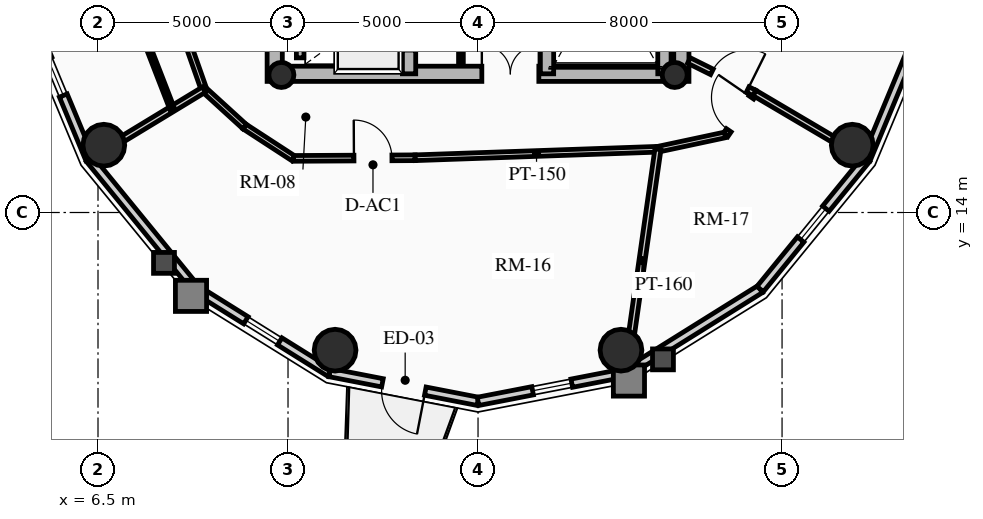
"""IFC4 building model, lengths in metres.
Left out: names, types, materials, properties, quantities, classifications, styles, units other than length and angle.
Written with IfcOpenShell. Run it as: python <this file> out.ifc"""

import sys

from ifc_helpers import new_model, si_unit, direction, frame, frame_2d, origin, origin_2d, place, context, subcontext, project, spatial, rectangle, circle, hollow_circle, extrude, source, transform, mapped, element, fill, save


model = new_model("IFC4")
c1 = context("Model", 3, precision=1e-05, world=origin(), true_north=direction((0.0, 1.0)))
c2 = subcontext(c1, "Body", "Model", "MODEL_VIEW")
j1 = project(units=[si_unit("LENGTHUNIT", "METRE"), si_unit("PLANEANGLEUNIT", "RADIAN")], contexts=[c1])
p1 = place(None, origin())
s1 = spatial("IfcSite", under=j1, at=p1, CompositionType="ELEMENT")
p2 = place(p1, origin())
s2 = spatial("IfcBuilding", under=s1, at=p2, CompositionType="ELEMENT")
p3 = place(p2, frame((0.0, 0.0, 214.12)))
s3 = spatial("IfcBuildingStorey", under=s2, at=p3, CompositionType="ELEMENT", Elevation=214.12)
for number, where, z_axis, x_axis in (
    (1, (11.15, 17.45, 0.0), (0.0, 0.0, 1.0), (0.0, 1.0, 0.0)),
    (2, (21.85, 17.45, 0.0), (0.0, 0.0, 1.0), (0.0, 1.0, 0.0)),
):
    element("IfcWall", number, at=place(p3, frame(where, z_axis=z_axis, x_axis=x_axis)), inside=s3, PredefinedType="SHEAR", context=c2, shape_type="SweptSolid", body=[
        extrude(rectangle(XDim=14.1, YDim=0.4, at=frame_2d((7.05, 0.0))), origin(), (0.0, 0.0, 1.0), 2.91),
    ])
p4 = place(p3, frame((11.15, 17.65, 0.0), z_axis=(0.0, 0.0, 1.0), x_axis=(1.0, 0.0, 0.0)))
e3 = element("IfcWall", 3, at=p4, inside=s3, PredefinedType="SHEAR", context=c2, shape_type="SweptSolid", body=[
    extrude(rectangle(XDim=10.7, YDim=0.4, at=frame_2d((5.35, 0.0))), origin(), (0.0, 0.0, 1.0), 2.91),
])
m1 = source(origin(), c2, "Body", "SweptSolid", [
    extrude(rectangle(XDim=1.5, YDim=2.02, at=frame_2d((0.75, 1.01))), frame((0.0, 0.21, 0.0), z_axis=(0.0, -1.0, 0.0), x_axis=(1.0, 0.0, 0.0)), (0.0, 0.0, 1.0), 0.42),
])
p5 = place(p4, frame((5.45, 0.0, 0.0)))
e4 = element("IfcOpeningElement", 4, at=p5, cuts=e3, PredefinedType="OPENING", context=c2, shape_type="MappedRepresentation", body=[
    mapped(m1, transform((0.0, 0.0, 0.0), x_axis=(1.0, 0.0, 0.0), y_axis=(0.0, 1.0, 0.0), z_axis=(0.0, 0.0, 1.0), scale=1.0)),
])
p6 = place(p3, frame((14.685, 17.65, 0.0), z_axis=(0.0, 0.0, 1.0), x_axis=(0.0, 1.0, 0.0)))
e5 = element("IfcWall", 5, at=p6, inside=s3, PredefinedType="SHEAR", context=c2, shape_type="SweptSolid", body=[
    extrude(rectangle(XDim=13.7, YDim=0.35, at=frame_2d((6.85, 0.0))), origin(), (0.0, 0.0, 1.0), 2.91),
])
m2 = source(origin(), c2, "Body", "SweptSolid", [
    extrude(rectangle(XDim=1.1, YDim=2.015, at=frame_2d((0.55, 1.007))), frame((0.0, 0.185, 0.0), z_axis=(0.0, -1.0, 0.0), x_axis=(1.0, 0.0, 0.0)), (0.0, 0.0, 1.0), 0.37),
])
p7 = place(p6, frame((4.85, 0.0, 0.0)))
e6 = element("IfcOpeningElement", 6, at=p7, cuts=e5, PredefinedType="OPENING", context=c2, shape_type="MappedRepresentation", body=[
    mapped(m2, transform((0.0, 0.0, 0.0), x_axis=(1.0, 0.0, 0.0), y_axis=(0.0, 1.0, 0.0), z_axis=(0.0, 0.0, 1.0), scale=1.0)),
])
p8 = place(p6, frame((0.625, 0.0, 0.0)))
e7 = element("IfcOpeningElement", 7, at=p8, cuts=e5, PredefinedType="OPENING", context=c2, shape_type="MappedRepresentation", body=[
    mapped(m2, transform((0.0, 0.0, 0.0), x_axis=(1.0, 0.0, 0.0), y_axis=(0.0, 1.0, 0.0), z_axis=(0.0, 0.0, 1.0), scale=1.0)),
])
p9 = place(p6, frame((2.625, 0.0, 0.0)))
e8 = element("IfcOpeningElement", 8, at=p9, cuts=e5, PredefinedType="OPENING", context=c2, shape_type="MappedRepresentation", body=[
    mapped(m2, transform((0.0, 0.0, 0.0), x_axis=(1.0, 0.0, 0.0), y_axis=(0.0, 1.0, 0.0), z_axis=(0.0, 0.0, 1.0), scale=1.0)),
])
m3 = source(origin(), c2, "Body", "SweptSolid", [
    extrude(rectangle(XDim=1.15, YDim=2.02, at=frame_2d((0.575, 1.01))), frame((0.0, 0.185, 0.0), z_axis=(0.0, -1.0, 0.0), x_axis=(1.0, 0.0, 0.0)), (0.0, 0.0, 1.0), 0.37),
])
p10 = place(p6, frame((7.27, 0.0, 0.0)))
e9 = element("IfcOpeningElement", 9, at=p10, cuts=e5, PredefinedType="OPENING", context=c2, shape_type="MappedRepresentation", body=[
    mapped(m3, transform((0.0, 0.0, 0.0), x_axis=(1.0, 0.0, 0.0), y_axis=(0.0, 1.0, 0.0), z_axis=(0.0, 0.0, 1.0), scale=1.0)),
])
p11 = place(p3, frame((18.315, 17.65, 0.0), z_axis=(0.0, 0.0, 1.0), x_axis=(0.0, 1.0, 0.0)))
e10 = element("IfcWall", 10, at=p11, inside=s3, PredefinedType="SHEAR", context=c2, shape_type="SweptSolid", body=[
    extrude(rectangle(XDim=9.6, YDim=0.35, at=frame_2d((4.8, 0.0))), origin(), (0.0, 0.0, 1.0), 2.91),
])
p12 = place(p11, frame((5.28, 0.0, 0.0)))
e11 = element("IfcOpeningElement", 11, at=p12, cuts=e10, PredefinedType="OPENING", context=c2, shape_type="MappedRepresentation", body=[
    mapped(m3, transform((0.0, 0.0, 0.0), x_axis=(1.0, 0.0, 0.0), y_axis=(0.0, 1.0, 0.0), z_axis=(0.0, 0.0, 1.0), scale=1.0)),
])
p13 = place(p3, frame((21.405, 17.65, 0.0), z_axis=(0.0, 0.0, 1.0), x_axis=(0.0, 1.0, 0.0)))
e12 = element("IfcWall", 12, at=p13, inside=s3, PredefinedType="SHEAR", context=c2, shape_type="SweptSolid", body=[
    extrude(rectangle(XDim=6.695, YDim=0.35, at=frame_2d((3.348, 0.0))), origin(), (0.0, 0.0, 1.0), 2.91),
])
for number, where, z_axis, x_axis in (
    (13, (11.325, 17.62, 0.0), (0.0, 0.0, 1.0), (1.0, 0.0, 0.0)),
    (14, (21.675, 17.62, 0.0), (0.0, 0.0, 1.0), (1.0, 0.0, 0.0)),
):
    element("IfcColumn", number, at=place(p3, frame(where, z_axis=z_axis, x_axis=x_axis)), inside=s3, PredefinedType="COLUMN", context=c2, shape_type="SweptSolid", body=[
        extrude(hollow_circle(Radius=0.33, WallThickness=0.025, at=origin_2d()), origin(), (0.0, 0.0, 1.0), 2.91),
    ])
for number, where, z_axis, x_axis in (
    (15, (6.653, 15.771, 0.0), (0.0, 0.0, 1.0), (1.0, 0.0, 0.0)),
    (16, (12.739, 10.377, 0.0), (0.0, 0.0, 1.0), (1.0, 0.0, 0.0)),
    (17, (20.261, 10.377, 0.0), (0.0, 0.0, 1.0), (1.0, 0.0, 0.0)),
    (18, (26.347, 15.771, 0.0), (0.0, 0.0, 1.0), (1.0, 0.0, 0.0)),
):
    element("IfcColumn", number, at=place(p3, frame(where, z_axis=z_axis, x_axis=x_axis)), inside=s3, PredefinedType="USERDEFINED", context=c2, shape_type="SweptSolid", body=[
        extrude(circle(Radius=0.55, at=origin_2d()), origin(), (0.0, 0.0, 1.0), 2.91),
    ])
p14 = place(p3, frame((6.282, 15.407, 0.0), z_axis=(0.0, 0.0, 1.0), x_axis=(-0.384036305194, 0.923317993052, 0.0)))
e19 = element("IfcWall", 19, at=p14, inside=s3, PredefinedType="SOLIDWALL", context=c2, shape_type="SweptSolid", body=[
    extrude(rectangle(XDim=4.671, YDim=0.22, at=frame_2d((2.335, 0.0))), origin(), (0.0, 0.0, 1.0), 2.322),
])
m4 = source(origin(), c2, "Body", "SweptSolid", [
    extrude(rectangle(XDim=1.05, YDim=1.3, at=frame_2d((0.525, 0.65))), frame((0.0, 0.12, 0.0), z_axis=(0.0, -1.0, 0.0), x_axis=(1.0, 0.0, 0.0)), (0.0, 0.0, 1.0), 0.24),
])
p15 = place(p14, frame((1.81, 0.0, 0.65)))
e20 = element("IfcOpeningElement", 20, at=p15, cuts=e19, PredefinedType="OPENING", context=c2, shape_type="MappedRepresentation", body=[
    mapped(m4, transform((0.0, 0.0, 0.0), x_axis=(1.0, 0.0, 0.0), y_axis=(0.0, 1.0, 0.0), z_axis=(0.0, 0.0, 1.0), scale=1.0)),
])
p16 = place(p3, frame((9.076, 11.985, 0.0), z_axis=(0.0, 0.0, 1.0), x_axis=(-0.632467166636, 0.774587169483, 0.0)))
e21 = element("IfcWall", 21, at=p16, inside=s3, PredefinedType="SOLIDWALL", context=c2, shape_type="SweptSolid", body=[
    extrude(rectangle(XDim=4.418, YDim=0.22, at=frame_2d((2.209, 0.0))), origin(), (0.0, 0.0, 1.0), 2.322),
])
p17 = place(p3, frame((12.597, 9.787, 0.0), z_axis=(0.0, 0.0, 1.0), x_axis=(-0.848318713376, 0.529485939886, 0.0)))
e22 = element("IfcWall", 22, at=p17, inside=s3, PredefinedType="SOLIDWALL", context=c2, shape_type="SweptSolid", body=[
    extrude(rectangle(XDim=4.15, YDim=0.22, at=frame_2d((2.075, 0.0))), origin(), (0.0, 0.0, 1.0), 2.322),
])
p18 = place(p17, frame((1.55, 0.0, 0.65)))
e23 = element("IfcOpeningElement", 23, at=p18, cuts=e22, PredefinedType="OPENING", context=c2, shape_type="MappedRepresentation", body=[
    mapped(m4, transform((0.0, 0.0, 0.0), x_axis=(1.0, 0.0, 0.0), y_axis=(0.0, 1.0, 0.0), z_axis=(0.0, 0.0, 1.0), scale=1.0)),
])
p19 = place(p3, frame((16.5, 9.03, 0.0), z_axis=(0.0, 0.0, 1.0), x_axis=(-0.981700307484, 0.190432419211, 0.0)))
e24 = element("IfcWall", 24, at=p19, inside=s3, PredefinedType="SOLIDWALL", context=c2, shape_type="SweptSolid", body=[
    extrude(rectangle(XDim=3.976, YDim=0.22, at=frame_2d((1.988, 0.0))), origin(), (0.0, 0.0, 1.0), 2.322),
])
m5 = source(origin(), c2, "Body", "SweptSolid", [
    extrude(rectangle(XDim=1.15, YDim=2.005, at=frame_2d((0.575, 1.002))), frame((0.0, 0.12, 0.0), z_axis=(0.0, -1.0, 0.0), x_axis=(1.0, 0.0, 0.0)), (0.0, 0.0, 1.0), 0.24),
])
p20 = place(p19, frame((1.413, 0.0, 0.0)))
e25 = element("IfcOpeningElement", 25, at=p20, cuts=e24, PredefinedType="OPENING", context=c2, shape_type="MappedRepresentation", body=[
    mapped(m5, transform((0.0, 0.0, 0.0), x_axis=(1.0, 0.0, 0.0), y_axis=(0.0, 1.0, 0.0), z_axis=(0.0, 0.0, 1.0), scale=1.0)),
])
p21 = place(p3, frame((20.403, 9.787, 0.0), z_axis=(0.0, 0.0, 1.0), x_axis=(-0.981700307484, -0.190432419211, 0.0)))
e26 = element("IfcWall", 26, at=p21, inside=s3, PredefinedType="SOLIDWALL", context=c2, shape_type="SweptSolid", body=[
    extrude(rectangle(XDim=3.976, YDim=0.22, at=frame_2d((1.988, 0.0))), origin(), (0.0, 0.0, 1.0), 2.322),
])
p22 = place(p21, frame((1.463, 0.0, 0.65)))
e27 = element("IfcOpeningElement", 27, at=p22, cuts=e26, PredefinedType="OPENING", context=c2, shape_type="MappedRepresentation", body=[
    mapped(m4, transform((0.0, 0.0, 0.0), x_axis=(1.0, 0.0, 0.0), y_axis=(0.0, 1.0, 0.0), z_axis=(0.0, 0.0, 1.0), scale=1.0)),
])
p23 = place(p3, frame((23.924, 11.985, 0.0), z_axis=(0.0, 0.0, 1.0), x_axis=(-0.848318713376, -0.529485939886, 0.0)))
e28 = element("IfcWall", 28, at=p23, inside=s3, PredefinedType="SOLIDWALL", context=c2, shape_type="SweptSolid", body=[
    extrude(rectangle(XDim=4.15, YDim=0.22, at=frame_2d((2.075, 0.0))), origin(), (0.0, 0.0, 1.0), 2.322),
])
p24 = place(p3, frame((26.718, 15.407, 0.0), z_axis=(0.0, 0.0, 1.0), x_axis=(-0.632467166636, -0.774587169483, 0.0)))
e29 = element("IfcWall", 29, at=p24, inside=s3, PredefinedType="SOLIDWALL", context=c2, shape_type="SweptSolid", body=[
    extrude(rectangle(XDim=4.418, YDim=0.22, at=frame_2d((2.209, 0.0))), origin(), (0.0, 0.0, 1.0), 2.322),
])
p25 = place(p24, frame((1.684, 0.0, 0.65)))
e30 = element("IfcOpeningElement", 30, at=p25, cuts=e29, PredefinedType="OPENING", context=c2, shape_type="MappedRepresentation", body=[
    mapped(m4, transform((0.0, 0.0, 0.0), x_axis=(1.0, 0.0, 0.0), y_axis=(0.0, 1.0, 0.0), z_axis=(0.0, 0.0, 1.0), scale=1.0)),
])
p26 = place(p3, frame((28.512, 19.719, 0.0), z_axis=(0.0, 0.0, 1.0), x_axis=(-0.384036305194, -0.923317993052, 0.0)))
e31 = element("IfcWall", 31, at=p26, inside=s3, PredefinedType="SOLIDWALL", context=c2, shape_type="SweptSolid", body=[
    extrude(rectangle(XDim=4.671, YDim=0.22, at=frame_2d((2.335, 0.0))), origin(), (0.0, 0.0, 1.0), 2.322),
])
p27 = place(p3, frame((11.82, 18.07, 0.0), z_axis=(0.0, 0.0, 1.0), x_axis=(0.0, 1.0, 0.0)))
e32 = element("IfcWall", 32, at=p27, inside=s3, PredefinedType="SHEAR", context=c2, shape_type="SweptSolid", body=[
    extrude(rectangle(XDim=1.635, YDim=0.2, at=frame_2d((0.817, 0.0))), origin(), (0.0, 0.0, 1.0), 2.91),
])
p28 = place(p3, frame((16.05, 17.92, 0.0), z_axis=(0.0, 0.0, 1.0), x_axis=(0.0, 1.0, 0.0)))
e33 = element("IfcWall", 33, at=p28, inside=s3, PredefinedType="PARTITIONING", context=c2, shape_type="SweptSolid", body=[
    extrude(rectangle(XDim=1.8, YDim=0.125, at=frame_2d((0.9, 0.0))), origin(), (0.0, 0.0, 1.0), 2.685),
])
m6 = source(origin(), c2, "Body", "SweptSolid", [
    extrude(rectangle(XDim=0.9, YDim=2.005, at=frame_2d((0.45, 1.002))), frame((0.0, 0.073, 0.0), z_axis=(0.0, -1.0, 0.0), x_axis=(1.0, 0.0, 0.0)), (0.0, 0.0, 1.0), 0.145),
])
p29 = place(p28, frame((0.42, 0.0, 0.0)))
e34 = element("IfcOpeningElement", 34, at=p29, cuts=e33, PredefinedType="OPENING", context=c2, shape_type="MappedRepresentation", body=[
    mapped(m6, transform((0.0, 0.0, 0.0), x_axis=(1.0, 0.0, 0.0), y_axis=(0.0, 1.0, 0.0), z_axis=(0.0, 0.0, 1.0), scale=1.0)),
])
p30 = place(p3, frame((8.832, 18.534, 0.0), z_axis=(0.0, 0.0, 1.0), x_axis=(0.332031819657, -0.943268186008, 0.0)))
e35 = element("IfcWall", 35, at=p30, inside=s3, PredefinedType="PARTITIONING", context=c2, shape_type="SweptSolid", body=[
    extrude(rectangle(XDim=1.377, YDim=0.15, at=frame_2d((0.688, 0.0))), origin(), (0.0, 0.0, 1.0), 2.255),
])
p31 = place(p3, frame((9.289, 17.235, 0.0), z_axis=(0.0, 0.0, 1.0), x_axis=(0.739015164946, -0.673688790155, 0.0)))
e36 = element("IfcWall", 36, at=p31, inside=s3, PredefinedType="PARTITIONING", context=c2, shape_type="SweptSolid", body=[
    extrude(rectangle(XDim=1.446, YDim=0.15, at=frame_2d((0.723, 0.0))), origin(), (0.0, 0.0, 1.0), 2.322),
])
p32 = place(p3, frame((10.358, 16.26, 0.0), z_axis=(0.0, 0.0, 1.0), x_axis=(0.838265397059, -0.545262435983, 0.0)))
e37 = element("IfcWall", 37, at=p32, inside=s3, PredefinedType="PARTITIONING", context=c2, shape_type="SweptSolid", body=[
    extrude(rectangle(XDim=1.534, YDim=0.15, at=frame_2d((0.767, 0.0))), origin(), (0.0, 0.0, 1.0), 2.255),
])
p33 = place(p3, frame((11.644, 15.424, 0.0), z_axis=(0.0, 0.0, 1.0), x_axis=(0.999986552511, 0.005186019339, 0.0)))
e38 = element("IfcWall", 38, at=p33, inside=s3, PredefinedType="PARTITIONING", context=c2, shape_type="SweptSolid", body=[
    extrude(rectangle(XDim=3.201, YDim=0.15, at=frame_2d((1.601, 0.0))), origin(), (0.0, 0.0, 1.0), 2.322),
])
m7 = source(origin(), c2, "Body", "SweptSolid", [
    extrude(rectangle(XDim=1.0, YDim=2.015, at=frame_2d((0.5, 1.007))), frame((0.0, 0.085, 0.0), z_axis=(0.0, -1.0, 0.0), x_axis=(1.0, 0.0, 0.0)), (0.0, 0.0, 1.0), 0.17),
])
p34 = place(p33, frame((1.591, 0.0, 0.0)))
e39 = element("IfcOpeningElement", 39, at=p34, cuts=e38, PredefinedType="OPENING", context=c2, shape_type="MappedRepresentation", body=[
    mapped(m7, transform((0.0, 0.0, 0.0), x_axis=(1.0, 0.0, 0.0), y_axis=(0.0, 1.0, 0.0), z_axis=(0.0, 0.0, 1.0), scale=1.0)),
])
p35 = place(p3, frame((14.845, 15.441, 0.0), z_axis=(0.0, 0.0, 1.0), x_axis=(0.99938794868, 0.034981824334, 0.0)))
e40 = element("IfcWall", 40, at=p35, inside=s3, PredefinedType="PARTITIONING", context=c2, shape_type="SweptSolid", body=[
    extrude(rectangle(XDim=6.393, YDim=0.15, at=frame_2d((3.196, 0.0))), origin(), (0.0, 0.0, 1.0), 2.255),
])
p36 = place(p3, frame((21.234, 15.664, 0.0), z_axis=(0.0, 0.0, 1.0), x_axis=(0.977931581182, 0.208925399431, 0.0)))
e41 = element("IfcWall", 41, at=p36, inside=s3, PredefinedType="PARTITIONING", context=c2, shape_type="SweptSolid", body=[
    extrude(rectangle(XDim=1.823, YDim=0.15, at=frame_2d((0.912, 0.0))), origin(), (0.0, 0.0, 1.0), 2.255),
])
p37 = place(p3, frame((23.017, 16.045, 0.0), z_axis=(0.0, 0.0, 1.0), x_axis=(0.566660656138, 0.823951273308, 0.0)))
e42 = element("IfcWall", 42, at=p37, inside=s3, PredefinedType="PARTITIONING", context=c2, shape_type="SweptSolid", body=[
    extrude(rectangle(XDim=1.336, YDim=0.15, at=frame_2d((0.668, 0.0))), origin(), (0.0, 0.0, 1.0), 2.322),
])
m8 = source(origin(), c2, "Body", "SweptSolid", [
    extrude(rectangle(XDim=1.05, YDim=2.015, at=frame_2d((0.525, 1.007))), frame((0.0, 0.085, 0.0), z_axis=(0.0, -1.0, 0.0), x_axis=(1.0, 0.0, 0.0)), (0.0, 0.0, 1.0), 0.17),
])
p38 = place(p37, frame((0.143, 0.0, 0.0)))
e43 = element("IfcOpeningElement", 43, at=p38, cuts=e42, PredefinedType="OPENING", context=c2, shape_type="MappedRepresentation", body=[
    mapped(m8, transform((0.0, 0.0, 0.0), x_axis=(1.0, 0.0, 0.0), y_axis=(0.0, 1.0, 0.0), z_axis=(0.0, 0.0, 1.0), scale=1.0)),
])
p39 = place(p3, frame((9.289, 17.235, 0.0), z_axis=(0.0, 0.0, 1.0), x_axis=(-0.854741081983, -0.519054604806, 0.0)))
e44 = element("IfcWall", 44, at=p39, inside=s3, PredefinedType="PARTITIONING", context=c2, shape_type="SweptSolid", body=[
    extrude(rectangle(XDim=3.499, YDim=0.16, at=frame_2d((1.75, 0.0))), origin(), (0.0, 0.0, 1.0), 2.322),
])
p40 = place(p3, frame((21.234, 15.664, 0.0), z_axis=(0.0, 0.0, 1.0), x_axis=(-0.141467563045, -0.989942891588, 0.0)))
e45 = element("IfcWall", 45, at=p40, inside=s3, PredefinedType="PARTITIONING", context=c2, shape_type="SweptSolid", body=[
    extrude(rectangle(XDim=5.918, YDim=0.16, at=frame_2d((2.959, 0.0))), origin(), (0.0, 0.0, 1.0), 2.322),
])
p41 = place(p3, frame((23.774, 17.146, 0.0), z_axis=(0.0, 0.0, 1.0), x_axis=(0.861296601099, -0.508102514198, 0.0)))
e46 = element("IfcWall", 46, at=p41, inside=s3, PredefinedType="PARTITIONING", context=c2, shape_type="SweptSolid", body=[
    extrude(rectangle(XDim=3.399, YDim=0.16, at=frame_2d((1.7, 0.0))), origin(), (0.0, 0.0, 1.0), 2.322),
])
p42 = place(p3, frame((22.05, 18.0, 0.0), z_axis=(0.0, 0.0, 1.0), x_axis=(0.896045848613, -0.443961526692, 0.0)))
e47 = element("IfcWall", 47, at=p42, inside=s3, PredefinedType="PARTITIONING", context=c2, shape_type="SweptSolid", body=[
    extrude(rectangle(XDim=1.924, YDim=0.16, at=frame_2d((0.962, 0.0))), origin(), (0.0, 0.0, 1.0), 2.255),
])
m9 = source(origin(), c2, "Body", "SweptSolid", [
    extrude(rectangle(XDim=1.05, YDim=2.015, at=frame_2d((0.525, 1.007))), frame((0.0, 0.09, 0.0), z_axis=(0.0, -1.0, 0.0), x_axis=(1.0, 0.0, 0.0)), (0.0, 0.0, 1.0), 0.18),
])
p43 = place(p42, frame((0.674, 0.0, 0.0)))
e48 = element("IfcOpeningElement", 48, at=p43, cuts=e47, PredefinedType="OPENING", context=c2, shape_type="MappedRepresentation", body=[
    mapped(m9, transform((0.0, 0.0, 0.0), x_axis=(1.0, 0.0, 0.0), y_axis=(0.0, 1.0, 0.0), z_axis=(0.0, 0.0, 1.0), scale=1.0)),
])
p44 = place(p3, frame((7.621, 18.868, 0.0), z_axis=(0.0, 0.0, 1.0), x_axis=(0.361712646649, -0.93228963378, 0.0)))
e49 = element("IfcWall", 49, at=p44, inside=s3, PredefinedType="PARTITIONING", context=c2, shape_type="SweptSolid", body=[
    extrude(rectangle(XDim=2.297, YDim=0.125, at=frame_2d((1.148, 0.0))), origin(), (0.0, 0.0, 1.0), 2.255),
])
m10 = source(origin(), c2, "Body", "SweptSolid", [
    extrude(rectangle(XDim=1.05, YDim=1.3, at=frame_2d((0.525, 0.65))), frame((0.0, 0.03, 0.0), z_axis=(0.0, -1.0, 0.0), x_axis=(1.0, 0.0, 0.0)), (0.0, 0.0, 1.0), 0.06),
])
p45 = place(p15, origin())
e50 = element("IfcWindow", 50, at=p45, inside=s3, PartitioningType="SINGLE_PANEL", PredefinedType="WINDOW", context=c2, shape_type="MappedRepresentation", body=[
    mapped(m10, transform((0.0, 0.0, 0.0), x_axis=(1.0, 0.0, 0.0), y_axis=(0.0, 1.0, 0.0), z_axis=(0.0, 0.0, 1.0), scale=1.0)),
])
fill(e20, e50)
p46 = place(p18, origin())
e51 = element("IfcWindow", 51, at=p46, inside=s3, PartitioningType="SINGLE_PANEL", PredefinedType="WINDOW", context=c2, shape_type="MappedRepresentation", body=[
    mapped(m10, transform((0.0, 0.0, 0.0), x_axis=(1.0, 0.0, 0.0), y_axis=(0.0, 1.0, 0.0), z_axis=(0.0, 0.0, 1.0), scale=1.0)),
])
fill(e23, e51)
m11 = source(origin(), c2, "Body", "SweptSolid", [
    extrude(rectangle(XDim=1.15, YDim=2.005, at=frame_2d((0.575, 1.002))), frame((0.0, 0.025, 0.0), z_axis=(0.0, -1.0, 0.0), x_axis=(1.0, 0.0, 0.0)), (0.0, 0.0, 1.0), 0.05),
])
p47 = place(p20, origin())
e52 = element("IfcDoor", 52, at=p47, inside=s3, OperationType="SINGLE_SWING_LEFT", PredefinedType="DOOR", context=c2, shape_type="MappedRepresentation", body=[
    mapped(m11, transform((0.0, 0.0, 0.0), x_axis=(1.0, 0.0, 0.0), y_axis=(0.0, 1.0, 0.0), z_axis=(0.0, 0.0, 1.0), scale=1.0)),
])
fill(e25, e52)
p48 = place(p22, origin())
e53 = element("IfcWindow", 53, at=p48, inside=s3, PartitioningType="SINGLE_PANEL", PredefinedType="WINDOW", context=c2, shape_type="MappedRepresentation", body=[
    mapped(m10, transform((0.0, 0.0, 0.0), x_axis=(1.0, 0.0, 0.0), y_axis=(0.0, 1.0, 0.0), z_axis=(0.0, 0.0, 1.0), scale=1.0)),
])
fill(e27, e53)
p49 = place(p25, origin())
e54 = element("IfcWindow", 54, at=p49, inside=s3, PartitioningType="SINGLE_PANEL", PredefinedType="WINDOW", context=c2, shape_type="MappedRepresentation", body=[
    mapped(m10, transform((0.0, 0.0, 0.0), x_axis=(1.0, 0.0, 0.0), y_axis=(0.0, 1.0, 0.0), z_axis=(0.0, 0.0, 1.0), scale=1.0)),
])
fill(e30, e54)
m12 = source(origin(), c2, "Body", "SweptSolid", [
    extrude(rectangle(XDim=1.5, YDim=2.02, at=frame_2d((0.75, 1.01))), frame((0.0, 0.025, 0.0), z_axis=(0.0, -1.0, 0.0), x_axis=(1.0, 0.0, 0.0)), (0.0, 0.0, 1.0), 0.05),
])
p50 = place(p5, origin())
e55 = element("IfcDoor", 55, at=p50, inside=s3, OperationType="DOUBLE_DOOR_SINGLE_SWING", PredefinedType="DOOR", context=c2, shape_type="MappedRepresentation", body=[
    mapped(m12, transform((0.0, 0.0, 0.0), x_axis=(1.0, 0.0, 0.0), y_axis=(0.0, 1.0, 0.0), z_axis=(0.0, 0.0, 1.0), scale=1.0)),
])
fill(e4, e55)
m13 = source(origin(), c2, "Body", "SweptSolid", [
    extrude(rectangle(XDim=1.05, YDim=2.015, at=frame_2d((0.525, 1.007))), frame((0.0, 0.025, 0.0), z_axis=(0.0, -1.0, 0.0), x_axis=(1.0, 0.0, 0.0)), (0.0, 0.0, 1.0), 0.05),
])
p51 = place(p43, origin())
e56 = element("IfcDoor", 56, at=p51, inside=s3, OperationType="SINGLE_SWING_RIGHT", PredefinedType="DOOR", context=c2, shape_type="MappedRepresentation", body=[
    mapped(m13, transform((0.0, 0.0, 0.0), x_axis=(1.0, 0.0, 0.0), y_axis=(0.0, 1.0, 0.0), z_axis=(0.0, 0.0, 1.0), scale=1.0)),
])
fill(e48, e56)
m14 = source(origin(), c2, "Body", "SweptSolid", [
    extrude(rectangle(XDim=1.0, YDim=2.015, at=frame_2d((0.5, 1.007))), frame((0.0, 0.025, 0.0), z_axis=(0.0, -1.0, 0.0), x_axis=(1.0, 0.0, 0.0)), (0.0, 0.0, 1.0), 0.05),
])
p52 = place(p34, origin())
e57 = element("IfcDoor", 57, at=p52, inside=s3, OperationType="SINGLE_SWING_LEFT", PredefinedType="DOOR", context=c2, shape_type="MappedRepresentation", body=[
    mapped(m14, transform((0.0, 0.0, 0.0), x_axis=(1.0, 0.0, 0.0), y_axis=(0.0, 1.0, 0.0), z_axis=(0.0, 0.0, 1.0), scale=1.0)),
])
fill(e39, e57)
p53 = place(p38, origin())
e58 = element("IfcDoor", 58, at=p53, inside=s3, OperationType="SINGLE_SWING_RIGHT", PredefinedType="DOOR", context=c2, shape_type="MappedRepresentation", body=[
    mapped(m13, transform((0.0, 0.0, 0.0), x_axis=(1.0, 0.0, 0.0), y_axis=(0.0, 1.0, 0.0), z_axis=(0.0, 0.0, 1.0), scale=1.0)),
])
fill(e43, e58)
save(model, sys.argv[1])
